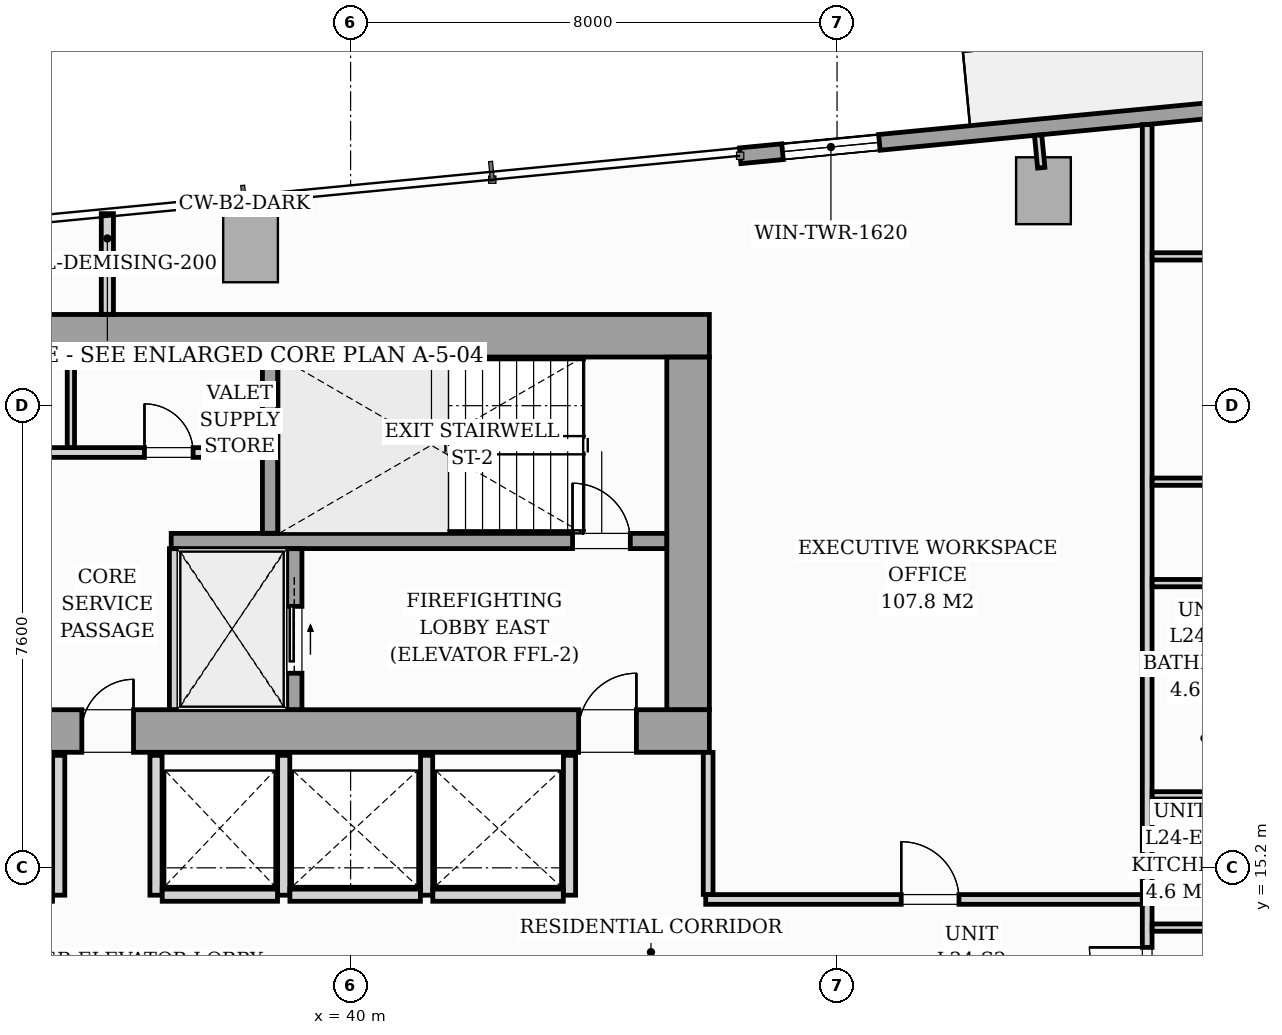
"""IFC4 building model, lengths in metres.
Left out: names, types, materials, properties, quantities, classifications, styles, units other than length and angle.
Written with IfcOpenShell. Run it as: python <this file> out.ifc"""

import sys

from ifc_helpers import new_model, si_unit, direction, frame, frame_2d, origin, origin_2d, place, context, subcontext, project, spatial, rectangle, i_section, extrude, source, transform, mapped, element, fill, save


model = new_model("IFC4")
c1 = context("Model", 3, precision=1e-05, world=origin(), true_north=direction((0.0, 1.0)))
c2 = subcontext(c1, "Body", "Model", "MODEL_VIEW")
j1 = project(units=[si_unit("LENGTHUNIT", "METRE"), si_unit("PLANEANGLEUNIT", "RADIAN")], contexts=[c1])
p1 = place(None, origin())
s1 = spatial("IfcSite", under=j1, at=p1, CompositionType="ELEMENT")
p2 = place(p1, origin())
s2 = spatial("IfcBuilding", under=s1, at=p2, CompositionType="ELEMENT")
p3 = place(p2, frame((0.0, 0.0, 87.4)))
s3 = spatial("IfcBuildingStorey", under=s2, at=p3, CompositionType="ELEMENT", Elevation=87.4)
m1 = source(origin(), c2, "Body", "SweptSolid", [
    extrude(i_section(OverallWidth=0.427, OverallDepth=0.483, WebThickness=0.051, FlangeThickness=0.082, FilletRadius=0.018, at=origin_2d()), origin(), (0.0, 0.0, 1.0), 3.196),
])
for number, where, z_axis, x_axis in (
    (1, (38.88, 17.4, 0.002), (0.0, 0.0, 1.0), (1.0, 0.0, 0.0)),
    (2, (45.6, 17.4, 0.002), (0.0, 0.0, 1.0), (1.0, 0.0, 0.0)),
    (3, (38.88, 24.0, 0.002), (0.0, 0.0, 1.0), (1.0, 0.0, 0.0)),
    (4, (45.6, 24.0, 0.002), (0.0, 0.0, 1.0), (1.0, 0.0, 0.0)),
):
    element("IfcColumn", number, at=place(p3, frame(where, z_axis=z_axis, x_axis=x_axis)), inside=s3, PredefinedType="PILASTER", context=c2, shape_type="MappedRepresentation", body=[
        mapped(m1, transform((0.0, 0.0, 0.0), scale=1.0)),
    ])
m2 = source(origin(), c2, "Body", "SweptSolid", [
    extrude(rectangle(XDim=0.9, YDim=1.1, at=origin_2d()), origin(), (0.0, 0.0, 1.0), 3.196),
])
for number, where, z_axis, x_axis in (
    (5, (38.354, 25.38, 0.002), (0.0, 0.0, 1.0), (0.995, 0.096, 0.0)),
    (6, (51.394, 26.335, 0.002), (0.0, 0.0, 1.0), (0.995, 0.096, 0.0)),
):
    element("IfcColumn", number, at=place(p3, frame(where, z_axis=z_axis, x_axis=x_axis)), inside=s3, PredefinedType="COLUMN", context=c2, shape_type="MappedRepresentation", body=[
        mapped(m2, transform((0.0, 0.0, 0.0), scale=1.0)),
    ])
p4 = place(p3, frame((46.406, 26.91, 0.0), z_axis=(0.0, 0.0, 1.0), x_axis=(0.995396638587, 0.095841180552, 0.0)))
e7 = element("IfcWall", 7, at=p4, inside=s3, PredefinedType="STANDARD", context=c2, shape_type="SweptSolid", body=[
    extrude(rectangle(XDim=19.11, YDim=0.26, at=frame_2d((9.555, 0.0))), origin(), (0.0, 0.0, 1.0), 2.94),
])
p5 = place(p4, frame((9.47, 0.0, 0.0)))
e8 = element("IfcOpeningElement", 8, at=p5, cuts=e7, PredefinedType="OPENING", context=c2, shape_type="SweptSolid", body=[
    extrude(rectangle(XDim=1.8, YDim=2.06, at=frame_2d((0.9, 1.03))), frame((0.0, 0.14, 0.0), z_axis=(0.0, -1.0, 0.0), x_axis=(1.0, 0.0, 0.0)), (0.0, 0.0, 1.0), 0.28),
])
p6 = place(p4, frame((0.7, 0.0, 0.65)))
e9 = element("IfcOpeningElement", 9, at=p6, cuts=e7, PredefinedType="OPENING", context=c2, shape_type="SweptSolid", body=[
    extrude(rectangle(XDim=1.6, YDim=1.5, at=frame_2d((0.8, 0.75))), frame((0.0, 0.14, 0.0), z_axis=(0.0, -1.0, 0.0), x_axis=(1.0, 0.0, 0.0)), (0.0, 0.0, 1.0), 0.28),
])
p7 = place(p3, frame((26.1, 17.45, 0.0), z_axis=(0.0, 0.0, 1.0), x_axis=(1.0, 0.0, 0.0)))
e10 = element("IfcWall", 10, at=p7, inside=s3, PredefinedType="SHEAR", context=c2, shape_type="SweptSolid", body=[
    extrude(rectangle(XDim=19.8, YDim=0.7, at=frame_2d((9.9, 0.0))), origin(), (0.0, 0.0, 1.0), 3.2),
])
p8 = place(p7, frame((1.05, 0.0, 0.0)))
e11 = element("IfcOpeningElement", 11, at=p8, cuts=e10, PredefinedType="OPENING", context=c2, shape_type="SweptSolid", body=[
    extrude(rectangle(XDim=0.95, YDim=2.06, at=frame_2d((0.475, 1.03))), frame((0.0, 0.36, 0.0), z_axis=(0.0, -1.0, 0.0), x_axis=(1.0, 0.0, 0.0)), (0.0, 0.0, 1.0), 0.72),
])
p9 = place(p7, frame((9.48, 0.0, 0.0)))
e12 = element("IfcOpeningElement", 12, at=p9, cuts=e10, PredefinedType="OPENING", context=c2, shape_type="SweptSolid", body=[
    extrude(rectangle(XDim=0.85, YDim=2.0, at=frame_2d((0.425, 1.0))), frame((0.0, 0.36, 0.0), z_axis=(0.0, -1.0, 0.0), x_axis=(1.0, 0.0, 0.0)), (0.0, 0.0, 1.0), 0.72),
])
p10 = place(p7, frame((17.65, 0.0, 0.0)))
e13 = element("IfcOpeningElement", 13, at=p10, cuts=e10, PredefinedType="OPENING", context=c2, shape_type="SweptSolid", body=[
    extrude(rectangle(XDim=0.95, YDim=2.06, at=frame_2d((0.475, 1.03))), frame((0.0, 0.36, 0.0), z_axis=(0.0, -1.0, 0.0), x_axis=(1.0, 0.0, 0.0)), (0.0, 0.0, 1.0), 0.72),
])
p11 = place(p3, frame((26.1, 23.95, 0.0), z_axis=(0.0, 0.0, 1.0), x_axis=(1.0, 0.0, 0.0)))
e14 = element("IfcWall", 14, at=p11, inside=s3, PredefinedType="SHEAR", context=c2, shape_type="SweptSolid", body=[
    extrude(rectangle(XDim=19.8, YDim=0.7, at=frame_2d((9.9, 0.0))), origin(), (0.0, 0.0, 1.0), 3.2),
])
p12 = place(p3, frame((45.55, 17.802, 0.0), z_axis=(0.0, 0.0, 1.0), x_axis=(0.0, 1.0, 0.0)))
e15 = element("IfcWall", 15, at=p12, inside=s3, PredefinedType="SHEAR", context=c2, shape_type="SweptSolid", body=[
    extrude(rectangle(XDim=5.796, YDim=0.7, at=frame_2d((2.898, 0.0))), origin(), (0.0, 0.0, 1.0), 3.2),
])
p13 = place(p3, frame((37.05, 20.575, 0.0), z_axis=(0.0, 0.0, 1.0), x_axis=(1.0, 0.0, 0.0)))
e16 = element("IfcWall", 16, at=p13, inside=s3, PredefinedType="SOLIDWALL", context=c2, shape_type="SweptSolid", body=[
    extrude(rectangle(XDim=8.148, YDim=0.25, at=frame_2d((4.074, 0.0))), origin(), (0.0, 0.0, 1.0), 3.2),
])
p14 = place(p13, frame((6.6, 0.0, 0.0)))
e17 = element("IfcOpeningElement", 17, at=p14, cuts=e16, PredefinedType="OPENING", context=c2, shape_type="SweptSolid", body=[
    extrude(rectangle(XDim=0.95, YDim=2.06, at=frame_2d((0.475, 1.03))), frame((0.0, 0.135, 0.0), z_axis=(0.0, -1.0, 0.0), x_axis=(1.0, 0.0, 0.0)), (0.0, 0.0, 1.0), 0.27),
])
p15 = place(p3, frame((38.675, 20.702, 0.0), z_axis=(0.0, 0.0, 1.0), x_axis=(0.0, 1.0, 0.0)))
e18 = element("IfcWall", 18, at=p15, inside=s3, PredefinedType="SOLIDWALL", context=c2, shape_type="SweptSolid", body=[
    extrude(rectangle(XDim=2.896, YDim=0.25, at=frame_2d((1.448, 0.0))), origin(), (0.0, 0.0, 1.0), 3.2),
])
p16 = place(p3, frame((37.1, 17.802, 0.0), z_axis=(0.0, 0.0, 1.0), x_axis=(0.0, 1.0, 0.0)))
e19 = element("IfcWall", 19, at=p16, inside=s3, PredefinedType="PARTITIONING", context=c2, shape_type="SweptSolid", body=[
    extrude(rectangle(XDim=2.646, YDim=0.16, at=frame_2d((1.323, 0.0))), origin(), (0.0, 0.0, 1.0), 2.94),
])
p17 = place(p3, frame((39.075, 17.802, 0.0), z_axis=(0.0, 0.0, 1.0), x_axis=(0.0, 1.0, 0.0)))
e20 = element("IfcWall", 20, at=p17, inside=s3, PredefinedType="SOLIDWALL", context=c2, shape_type="SweptSolid", body=[
    extrude(rectangle(XDim=2.646, YDim=0.25, at=frame_2d((1.323, 0.0))), origin(), (0.0, 0.0, 1.0), 3.2),
])
p18 = place(p17, frame((0.598, 0.0, 0.0)))
e21 = element("IfcOpeningElement", 21, at=p18, cuts=e20, PredefinedType="OPENING", context=c2, shape_type="SweptSolid", body=[
    extrude(rectangle(XDim=1.1, YDim=2.08, at=frame_2d((0.55, 1.04))), frame((0.0, 0.135, 0.0), z_axis=(0.0, -1.0, 0.0), x_axis=(1.0, 0.0, 0.0)), (0.0, 0.0, 1.0), 0.27),
])
p19 = place(p3, frame((33.452, 22.03, 0.0), z_axis=(0.0, 0.0, 1.0), x_axis=(1.0, 0.0, 0.0)))
e22 = element("IfcWall", 22, at=p19, inside=s3, PredefinedType="PARTITIONING", context=c2, shape_type="SweptSolid", body=[
    extrude(rectangle(XDim=5.096, YDim=0.16, at=frame_2d((2.548, 0.0))), origin(), (0.0, 0.0, 1.0), 2.94),
])
p20 = place(p19, frame((0.538, 0.0, 0.0)))
e23 = element("IfcOpeningElement", 23, at=p20, cuts=e22, PredefinedType="OPENING", context=c2, shape_type="SweptSolid", body=[
    extrude(rectangle(XDim=0.8, YDim=2.05, at=frame_2d((0.4, 1.025))), frame((0.0, 0.09, 0.0), z_axis=(0.0, -1.0, 0.0), x_axis=(1.0, 0.0, 0.0)), (0.0, 0.0, 1.0), 0.18),
])
p21 = place(p19, frame((3.158, 0.0, 0.0)))
e24 = element("IfcOpeningElement", 24, at=p21, cuts=e22, PredefinedType="OPENING", context=c2, shape_type="SweptSolid", body=[
    extrude(rectangle(XDim=0.8, YDim=2.05, at=frame_2d((0.4, 1.025))), frame((0.0, 0.09, 0.0), z_axis=(0.0, -1.0, 0.0), x_axis=(1.0, 0.0, 0.0)), (0.0, 0.0, 1.0), 0.18),
])
p22 = place(p3, frame((35.4, 22.112, 0.0), z_axis=(0.0, 0.0, 1.0), x_axis=(0.0, 1.0, 0.0)))
e25 = element("IfcWall", 25, at=p22, inside=s3, PredefinedType="PARTITIONING", context=c2, shape_type="SweptSolid", body=[
    extrude(rectangle(XDim=1.486, YDim=0.12, at=frame_2d((0.743, 0.0))), origin(), (0.0, 0.0, 1.0), 2.94),
])
for number, where, z_axis, x_axis in (
    (26, (35.2, 14.75, 0.0), (0.0, 0.0, 1.0), (0.0, 1.0, 0.0)),
    (27, (36.8, 14.75, 0.0), (0.0, 0.0, 1.0), (0.0, 1.0, 0.0)),
    (28, (38.9, 14.75, 0.0), (0.0, 0.0, 1.0), (0.0, 1.0, 0.0)),
):
    element("IfcWall", number, at=place(p3, frame(where, z_axis=z_axis, x_axis=x_axis)), inside=s3, PredefinedType="PARTITIONING", context=c2, shape_type="SweptSolid", body=[
        extrude(rectangle(XDim=2.3, YDim=0.2, at=frame_2d((1.15, 0.0))), origin(), (0.0, 0.0, 1.0), 2.94),
    ])
p23 = place(p3, frame((36.902, 14.75, 0.0), z_axis=(0.0, 0.0, 1.0), x_axis=(1.0, 0.0, 0.0)))
e29 = element("IfcWall", 29, at=p23, inside=s3, PredefinedType="PARTITIONING", context=c2, shape_type="SweptSolid", body=[
    extrude(rectangle(XDim=1.896, YDim=0.2, at=frame_2d((0.948, 0.0))), origin(), (0.0, 0.0, 1.0), 2.94),
])
for number, where, z_axis, x_axis in (
    (30, (41.25, 14.75, 0.0), (0.0, 0.0, 1.0), (0.0, 1.0, 0.0)),
    (31, (43.6, 14.75, 0.0), (0.0, 0.0, 1.0), (0.0, 1.0, 0.0)),
):
    element("IfcWall", number, at=place(p3, frame(where, z_axis=z_axis, x_axis=x_axis)), inside=s3, PredefinedType="PARTITIONING", context=c2, shape_type="SweptSolid", body=[
        extrude(rectangle(XDim=2.3, YDim=0.2, at=frame_2d((1.15, 0.0))), origin(), (0.0, 0.0, 1.0), 2.94),
    ])
for number, where, z_axis, x_axis in (
    (32, (39.002, 14.75, 0.0), (0.0, 0.0, 1.0), (1.0, 0.0, 0.0)),
    (33, (41.352, 14.75, 0.0), (0.0, 0.0, 1.0), (1.0, 0.0, 0.0)),
):
    element("IfcWall", number, at=place(p3, frame(where, z_axis=z_axis, x_axis=x_axis)), inside=s3, PredefinedType="PARTITIONING", context=c2, shape_type="SweptSolid", body=[
        extrude(rectangle(XDim=2.146, YDim=0.2, at=frame_2d((1.073, 0.0))), origin(), (0.0, 0.0, 1.0), 2.94),
    ])
p24 = place(p3, frame((53.1, 12.572, 0.0), z_axis=(0.0, 0.0, 1.0), x_axis=(0.0, 1.0, 0.0)))
e34 = element("IfcWall", 34, at=p24, inside=s3, PredefinedType="PARTITIONING", context=c2, shape_type="SweptSolid", body=[
    extrude(rectangle(XDim=14.849, YDim=0.16, at=frame_2d((7.425, 0.0))), origin(), (0.0, 0.0, 1.0), 2.94),
])
p25 = place(p24, frame((0.37, 0.0, 0.0)))
e35 = element("IfcOpeningElement", 35, at=p25, cuts=e34, PredefinedType="OPENING", context=c2, shape_type="SweptSolid", body=[
    extrude(rectangle(XDim=0.95, YDim=2.06, at=frame_2d((0.475, 1.03))), frame((0.0, 0.09, 0.0), z_axis=(0.0, -1.0, 0.0), x_axis=(1.0, 0.0, 0.0)), (0.0, 0.0, 1.0), 0.18),
])
p26 = place(p3, frame((36.0, 24.302, 0.0), z_axis=(0.0, 0.0, 1.0), x_axis=(0.0, 1.0, 0.0)))
e36 = element("IfcWall", 36, at=p26, inside=s3, PredefinedType="PARTITIONING", context=c2, shape_type="SweptSolid", body=[
    extrude(rectangle(XDim=1.656, YDim=0.2, at=frame_2d((0.828, 0.0))), origin(), (0.0, 0.0, 1.0), 2.94),
])
for number, where, z_axis, x_axis in (
    (37, (53.182, 16.392, 0.0), (0.0, 0.0, 1.0), (1.0, 0.0, 0.0)),
    (38, (53.182, 14.217, 0.0), (0.0, 0.0, 1.0), (1.0, 0.0, 0.0)),
    (39, (53.182, 18.567, 0.0), (0.0, 0.0, 1.0), (1.0, 0.0, 0.0)),
):
    element("IfcWall", number, at=place(p3, frame(where, z_axis=z_axis, x_axis=x_axis)), inside=s3, PredefinedType="PARTITIONING", context=c2, shape_type="SweptSolid", body=[
        extrude(rectangle(XDim=2.256, YDim=0.12, at=frame_2d((1.128, 0.0))), origin(), (0.0, 0.0, 1.0), 2.94),
    ])
p27 = place(p3, frame((53.182, 25.255, 0.0), z_axis=(0.0, 0.0, 1.0), x_axis=(1.0, 0.0, 0.0)))
e40 = element("IfcWall", 40, at=p27, inside=s3, PredefinedType="PARTITIONING", context=c2, shape_type="SweptSolid", body=[
    extrude(rectangle(XDim=7.451, YDim=0.12, at=frame_2d((3.726, 0.0))), origin(), (0.0, 0.0, 1.0), 2.94),
])
p28 = place(p27, frame((3.331, 0.0, 0.0)))
e41 = element("IfcOpeningElement", 41, at=p28, cuts=e40, PredefinedType="OPENING", context=c2, shape_type="SweptSolid", body=[
    extrude(rectangle(XDim=0.85, YDim=2.05, at=frame_2d((0.425, 1.025))), frame((0.0, 0.07, 0.0), z_axis=(0.0, -1.0, 0.0), x_axis=(1.0, 0.0, 0.0)), (0.0, 0.0, 1.0), 0.14),
])
p29 = place(p3, frame((53.182, 21.55, 0.0), z_axis=(0.0, 0.0, 1.0), x_axis=(1.0, 0.0, 0.0)))
e42 = element("IfcWall", 42, at=p29, inside=s3, PredefinedType="PARTITIONING", context=c2, shape_type="SweptSolid", body=[
    extrude(rectangle(XDim=15.37, YDim=0.12, at=frame_2d((7.685, 0.0))), origin(), (0.0, 0.0, 1.0), 2.94),
])
p30 = place(p29, frame((5.223, 0.0, 0.0)))
e43 = element("IfcOpeningElement", 43, at=p30, cuts=e42, PredefinedType="OPENING", context=c2, shape_type="SweptSolid", body=[
    extrude(rectangle(XDim=0.85, YDim=2.05, at=frame_2d((0.425, 1.025))), frame((0.0, 0.07, 0.0), z_axis=(0.0, -1.0, 0.0), x_axis=(1.0, 0.0, 0.0)), (0.0, 0.0, 1.0), 0.14),
])
p31 = place(p3, frame((53.182, 19.882, 0.0), z_axis=(0.0, 0.0, 1.0), x_axis=(1.0, 0.0, 0.0)))
e44 = element("IfcWall", 44, at=p31, inside=s3, PredefinedType="PARTITIONING", context=c2, shape_type="SweptSolid", body=[
    extrude(rectangle(XDim=15.531, YDim=0.12, at=frame_2d((7.765, 0.0))), origin(), (0.0, 0.0, 1.0), 2.94),
])
p32 = place(p31, frame((5.223, 0.0, 0.0)))
e45 = element("IfcOpeningElement", 45, at=p32, cuts=e44, PredefinedType="OPENING", context=c2, shape_type="SweptSolid", body=[
    extrude(rectangle(XDim=0.85, YDim=2.05, at=frame_2d((0.425, 1.025))), frame((0.0, 0.07, 0.0), z_axis=(0.0, -1.0, 0.0), x_axis=(1.0, 0.0, 0.0)), (0.0, 0.0, 1.0), 0.14),
])
p33 = place(p3, frame((45.84, 14.68, 0.0), z_axis=(0.0, 0.0, 1.0), x_axis=(1.0, 0.0, 0.0)))
e46 = element("IfcWall", 46, at=p33, inside=s3, PredefinedType="PARTITIONING", context=c2, shape_type="SweptSolid", body=[
    extrude(rectangle(XDim=7.178, YDim=0.16, at=frame_2d((3.589, 0.0))), origin(), (0.0, 0.0, 1.0), 2.94),
])
p34 = place(p33, frame((3.215, 0.0, 0.0)))
e47 = element("IfcOpeningElement", 47, at=p34, cuts=e46, PredefinedType="OPENING", context=c2, shape_type="SweptSolid", body=[
    extrude(rectangle(XDim=0.95, YDim=2.06, at=frame_2d((0.475, 1.03))), frame((0.0, 0.09, 0.0), z_axis=(0.0, -1.0, 0.0), x_axis=(1.0, 0.0, 0.0)), (0.0, 0.0, 1.0), 0.18),
])
p35 = place(p3, frame((45.88, 14.762, 0.0), z_axis=(0.0, 0.0, 1.0), x_axis=(0.0, 1.0, 0.0)))
e48 = element("IfcWall", 48, at=p35, inside=s3, PredefinedType="PARTITIONING", context=c2, shape_type="SweptSolid", body=[
    extrude(rectangle(XDim=2.336, YDim=0.16, at=frame_2d((1.168, 0.0))), origin(), (0.0, 0.0, 1.0), 2.94),
])
p36 = place(p3, frame((51.358, 26.713, 0.0), z_axis=(0.0, 0.0, 1.0), x_axis=(-0.095772948675, 0.995403205893, 0.0)))
e49 = element("IfcWall", 49, at=p36, inside=s3, PredefinedType="PARTITIONING", context=c2, shape_type="SweptSolid", body=[
    extrude(rectangle(XDim=0.538, YDim=0.12, at=frame_2d((0.269, 0.0))), origin(), (0.0, 0.0, 1.0), 2.94),
])
m3 = source(origin(), c2, "Body", "SweptSolid", [
    extrude(rectangle(XDim=1.6, YDim=1.5, at=frame_2d((0.8, 0.75))), frame((0.0, 0.03, 0.0), z_axis=(0.0, -1.0, 0.0), x_axis=(1.0, 0.0, 0.0)), (0.0, 0.0, 1.0), 0.06),
])
p37 = place(p6, origin())
e50 = element("IfcWindow", 50, at=p37, inside=s3, PartitioningType="SINGLE_PANEL", PredefinedType="WINDOW", context=c2, shape_type="MappedRepresentation", body=[
    mapped(m3, transform((0.0, 0.0, 0.0), scale=1.0)),
])
fill(e9, e50)
m4 = source(origin(), c2, "Body", "SweptSolid", [
    extrude(rectangle(XDim=0.85, YDim=2.0, at=frame_2d((0.425, 1.0))), frame((0.0, 0.025, 0.0), z_axis=(0.0, -1.0, 0.0), x_axis=(1.0, 0.0, 0.0)), (0.0, 0.0, 1.0), 0.05),
])
p38 = place(p9, origin())
e51 = element("IfcDoor", 51, at=p38, inside=s3, OperationType="SINGLE_SWING_RIGHT", PredefinedType="DOOR", context=c2, shape_type="MappedRepresentation", body=[
    mapped(m4, transform((0.0, 0.0, 0.0), scale=1.0)),
])
fill(e12, e51)
m5 = source(origin(), c2, "Body", "SweptSolid", [
    extrude(rectangle(XDim=0.95, YDim=2.06, at=frame_2d((0.475, 1.03))), frame((0.0, 0.025, 0.0), z_axis=(0.0, -1.0, 0.0), x_axis=(1.0, 0.0, 0.0)), (0.0, 0.0, 1.0), 0.05),
])
p39 = place(p10, origin())
e52 = element("IfcDoor", 52, at=p39, inside=s3, OperationType="SINGLE_SWING_RIGHT", PredefinedType="DOOR", context=c2, shape_type="MappedRepresentation", body=[
    mapped(m5, transform((0.0, 0.0, 0.0), scale=1.0)),
])
fill(e13, e52)
p40 = place(p14, origin())
e53 = element("IfcDoor", 53, at=p40, inside=s3, OperationType="SINGLE_SWING_LEFT", PredefinedType="DOOR", context=c2, shape_type="MappedRepresentation", body=[
    mapped(m5, transform((0.0, 0.0, 0.0), scale=1.0)),
])
fill(e17, e53)
m6 = source(origin(), c2, "Body", "SweptSolid", [
    extrude(rectangle(XDim=1.1, YDim=2.08, at=frame_2d((0.55, 1.04))), frame((0.0, 0.025, 0.0), z_axis=(0.0, -1.0, 0.0), x_axis=(1.0, 0.0, 0.0)), (0.0, 0.0, 1.0), 0.05),
])
p41 = place(p18, origin())
e54 = element("IfcDoor", 54, at=p41, inside=s3, OperationType="SLIDING_TO_RIGHT", PredefinedType="DOOR", context=c2, shape_type="MappedRepresentation", body=[
    mapped(m6, transform((0.0, 0.0, 0.0), scale=1.0)),
])
fill(e21, e54)
m7 = source(origin(), c2, "Body", "SweptSolid", [
    extrude(rectangle(XDim=0.8, YDim=2.05, at=frame_2d((0.4, 1.025))), frame((0.0, 0.025, 0.0), z_axis=(0.0, -1.0, 0.0), x_axis=(1.0, 0.0, 0.0)), (0.0, 0.0, 1.0), 0.05),
])
p42 = place(p21, origin())
e55 = element("IfcDoor", 55, at=p42, inside=s3, OperationType="SINGLE_SWING_LEFT", PredefinedType="DOOR", context=c2, shape_type="MappedRepresentation", body=[
    mapped(m7, transform((0.0, 0.0, 0.0), scale=1.0)),
])
fill(e24, e55)
m8 = source(origin(), c2, "Body", "SweptSolid", [
    extrude(rectangle(XDim=0.95, YDim=2.06, at=frame_2d((0.475, 1.03))), frame((0.0, 0.025, 0.0), z_axis=(0.0, -1.0, 0.0), x_axis=(1.0, 0.0, 0.0)), (0.0, 0.0, 1.0), 0.05),
])
p43 = place(p25, origin())
e56 = element("IfcDoor", 56, at=p43, inside=s3, OperationType="SINGLE_SWING_RIGHT", PredefinedType="DOOR", context=c2, shape_type="MappedRepresentation", body=[
    mapped(m8, transform((0.0, 0.0, 0.0), scale=1.0)),
])
fill(e35, e56)
p44 = place(p34, origin())
e57 = element("IfcDoor", 57, at=p44, inside=s3, OperationType="SINGLE_SWING_LEFT", PredefinedType="DOOR", context=c2, shape_type="MappedRepresentation", body=[
    mapped(m8, transform((0.0, 0.0, 0.0), scale=1.0)),
])
fill(e47, e57)
save(model, sys.argv[1])
